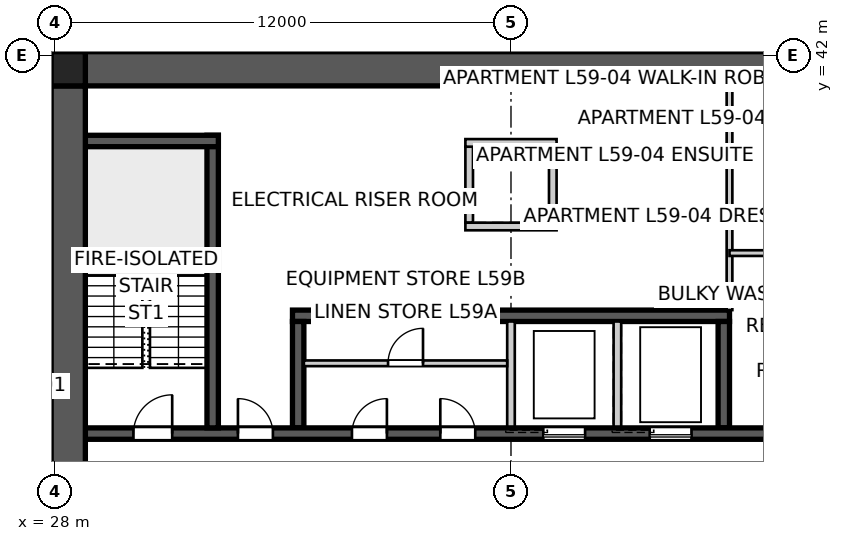
"""IFC4 building model, lengths in metres.
Left out: names, types, materials, properties, quantities, classifications, styles, units other than length and angle.
Written with IfcOpenShell. Run it as: python <this file> out.ifc"""

import sys

from ifc_helpers import new_model, si_unit, direction, frame, frame_2d, origin, origin_2d, place, context, subcontext, project, spatial, polyline, rectangle, outline, extrude, element, fill, save


model = new_model("IFC4")
c1 = context("Model", 3, precision=1e-05, world=origin(), true_north=direction((0.0, 1.0)))
c2 = subcontext(c1, "Body", "Model", "MODEL_VIEW")
j1 = project(units=[si_unit("LENGTHUNIT", "METRE"), si_unit("PLANEANGLEUNIT", "RADIAN")], contexts=[c1])
p1 = place(None, origin())
s1 = spatial("IfcSite", under=j1, at=p1, CompositionType="ELEMENT")
p2 = place(p1, origin())
s2 = spatial("IfcBuilding", under=s1, at=p2, CompositionType="ELEMENT")
p3 = place(p2, frame((0.0, 0.0, 215.0)))
s3 = spatial("IfcBuildingStorey", under=s2, at=p3, CompositionType="ELEMENT", Elevation=215.0)
p4 = place(p3, frame((28.8, 41.65, 0.0), z_axis=(0.0, 0.0, 1.0), x_axis=(1.0, 0.0, 0.0)))
e1 = element("IfcWall", 1, at=p4, inside=s3, PredefinedType="SHEAR", context=c2, shape_type="SweptSolid", body=[
    extrude(outline(polyline([(0.0, -0.45), (22.4, -0.45), (22.4, -0.025), (22.85, -0.025), (22.85, 0.025), (22.4, 0.025), (22.4, 0.45), (0.0, 0.45), (0.0, 0.025), (-0.45, 0.025), (-0.45, -0.025), (0.0, -0.025), (0.0, -0.45)])), origin(), (0.0, 0.0, 1.0), 3.4),
])
p5 = place(p3, frame((28.35, 41.2, 0.0), z_axis=(0.0, 0.0, 1.0), x_axis=(0.0, -1.0, 0.0)))
e2 = element("IfcWall", 2, at=p5, inside=s3, PredefinedType="SHEAR", context=c2, shape_type="SweptSolid", body=[
    extrude(outline(polyline([(0.0, -0.45), (22.4, -0.45), (22.4, -0.025), (22.85, -0.025), (22.85, 0.025), (22.4, 0.025), (22.4, 0.45), (0.0, 0.45), (0.0, 0.025), (-0.45, 0.025), (-0.45, -0.025), (0.0, -0.025), (0.0, -0.45)])), origin(), (0.0, 0.0, 1.0), 3.4),
])
p6 = place(p5, frame((11.14, 0.0, 0.0)))
e3 = element("IfcOpeningElement", 3, at=p6, cuts=e2, PredefinedType="OPENING", context=c2, shape_type="SweptSolid", body=[
    extrude(rectangle(XDim=1.02, YDim=2.4, at=frame_2d((0.51, 1.2))), frame((0.0, 0.46, 0.0), z_axis=(0.0, -1.0, 0.0), x_axis=(1.0, 0.0, 0.0)), (0.0, 0.0, 1.0), 0.92),
])
p7 = place(p3, frame((28.8, 32.05, 0.0), z_axis=(0.0, 0.0, 1.0), x_axis=(1.0, 0.0, 0.0)))
e4 = element("IfcWall", 4, at=p7, inside=s3, PredefinedType="SHEAR", context=c2, shape_type="SweptSolid", body=[
    extrude(rectangle(XDim=22.4, YDim=0.3, at=frame_2d((11.2, 0.0))), origin(), (0.0, 0.0, 1.0), 3.4),
])
p8 = place(p7, frame((19.04, 0.0, 0.0)))
e5 = element("IfcOpeningElement", 5, at=p8, cuts=e4, PredefinedType="OPENING", context=c2, shape_type="SweptSolid", body=[
    extrude(rectangle(XDim=0.92, YDim=2.1, at=frame_2d((0.46, 1.05))), frame((0.0, 0.16, 0.0), z_axis=(0.0, -1.0, 0.0), x_axis=(1.0, 0.0, 0.0)), (0.0, 0.0, 1.0), 0.32),
])
p9 = place(p7, frame((1.265, 0.0, 0.0)))
e6 = element("IfcOpeningElement", 6, at=p9, cuts=e4, PredefinedType="OPENING", context=c2, shape_type="SweptSolid", body=[
    extrude(rectangle(XDim=1.02, YDim=2.1, at=frame_2d((0.51, 1.05))), frame((0.0, 0.16, 0.0), z_axis=(0.0, -1.0, 0.0), x_axis=(1.0, 0.0, 0.0)), (0.0, 0.0, 1.0), 0.32),
])
p10 = place(p7, frame((4.015, 0.0, 0.0)))
e7 = element("IfcOpeningElement", 7, at=p10, cuts=e4, PredefinedType="OPENING", context=c2, shape_type="SweptSolid", body=[
    extrude(rectangle(XDim=0.92, YDim=2.1, at=frame_2d((0.46, 1.05))), frame((0.0, 0.16, 0.0), z_axis=(0.0, -1.0, 0.0), x_axis=(1.0, 0.0, 0.0)), (0.0, 0.0, 1.0), 0.32),
])
p11 = place(p7, frame((7.015, 0.0, 0.0)))
e8 = element("IfcOpeningElement", 8, at=p11, cuts=e4, PredefinedType="OPENING", context=c2, shape_type="SweptSolid", body=[
    extrude(rectangle(XDim=0.92, YDim=2.1, at=frame_2d((0.46, 1.05))), frame((0.0, 0.16, 0.0), z_axis=(0.0, -1.0, 0.0), x_axis=(1.0, 0.0, 0.0)), (0.0, 0.0, 1.0), 0.32),
])
p12 = place(p7, frame((9.34, 0.0, 0.0)))
e9 = element("IfcOpeningElement", 9, at=p12, cuts=e4, PredefinedType="OPENING", context=c2, shape_type="SweptSolid", body=[
    extrude(rectangle(XDim=0.92, YDim=2.1, at=frame_2d((0.46, 1.05))), frame((0.0, 0.16, 0.0), z_axis=(0.0, -1.0, 0.0), x_axis=(1.0, 0.0, 0.0)), (0.0, 0.0, 1.0), 0.32),
])
p13 = place(p7, frame((12.05, 0.0, 0.0)))
e10 = element("IfcOpeningElement", 10, at=p13, cuts=e4, PredefinedType="OPENING", context=c2, shape_type="SweptSolid", body=[
    extrude(rectangle(XDim=1.1, YDim=2.1, at=frame_2d((0.55, 1.05))), frame((0.0, 0.16, 0.0), z_axis=(0.0, -1.0, 0.0), x_axis=(1.0, 0.0, 0.0)), (0.0, 0.0, 1.0), 0.32),
])
p14 = place(p7, frame((14.85, 0.0, 0.0)))
e11 = element("IfcOpeningElement", 11, at=p14, cuts=e4, PredefinedType="OPENING", context=c2, shape_type="SweptSolid", body=[
    extrude(rectangle(XDim=1.1, YDim=2.1, at=frame_2d((0.55, 1.05))), frame((0.0, 0.16, 0.0), z_axis=(0.0, -1.0, 0.0), x_axis=(1.0, 0.0, 0.0)), (0.0, 0.0, 1.0), 0.32),
])
p15 = place(p3, frame((34.25, 35.15, 0.0), z_axis=(0.0, 0.0, 1.0), x_axis=(1.0, 0.0, 0.0)))
e12 = element("IfcWall", 12, at=p15, inside=s3, PredefinedType="SHEAR", context=c2, shape_type="SweptSolid", body=[
    extrude(rectangle(XDim=11.5, YDim=0.3, at=frame_2d((5.75, 0.0))), origin(), (0.0, 0.0, 1.0), 3.4),
])
p16 = place(p3, frame((34.4, 32.2, 0.0), z_axis=(0.0, 0.0, 1.0), x_axis=(0.0, 1.0, 0.0)))
e13 = element("IfcWall", 13, at=p16, inside=s3, PredefinedType="SHEAR", context=c2, shape_type="SweptSolid", body=[
    extrude(rectangle(XDim=2.8, YDim=0.3, at=frame_2d((1.4, 0.0))), origin(), (0.0, 0.0, 1.0), 3.4),
])
for number, where, z_axis, x_axis in (
    (14, (40.0, 32.2, 0.0), (0.0, 0.0, 1.0), (0.0, 1.0, 0.0)),
    (15, (42.8, 32.2, 0.0), (0.0, 0.0, 1.0), (0.0, 1.0, 0.0)),
):
    element("IfcWall", number, at=place(p3, frame(where, z_axis=z_axis, x_axis=x_axis)), inside=s3, PredefinedType="SOLIDWALL", context=c2, shape_type="SweptSolid", body=[
        extrude(rectangle(XDim=2.8, YDim=0.2, at=frame_2d((1.4, 0.0))), origin(), (0.0, 0.0, 1.0), 3.4),
    ])
p17 = place(p3, frame((45.6, 32.2, 0.0), z_axis=(0.0, 0.0, 1.0), x_axis=(0.0, 1.0, 0.0)))
e16 = element("IfcWall", 16, at=p17, inside=s3, PredefinedType="SHEAR", context=c2, shape_type="SweptSolid", body=[
    extrude(rectangle(XDim=2.8, YDim=0.3, at=frame_2d((1.4, 0.0))), origin(), (0.0, 0.0, 1.0), 3.4),
])
p18 = place(p3, frame((32.15, 32.2, 0.0), z_axis=(0.0, 0.0, 1.0), x_axis=(0.0, 1.0, 0.0)))
e17 = element("IfcWall", 17, at=p18, inside=s3, PredefinedType="SHEAR", context=c2, shape_type="SweptSolid", body=[
    extrude(rectangle(XDim=7.7, YDim=0.3, at=frame_2d((3.85, 0.0))), origin(), (0.0, 0.0, 1.0), 3.4),
])
p19 = place(p3, frame((28.8, 39.75, 0.0), z_axis=(0.0, 0.0, 1.0), x_axis=(1.0, 0.0, 0.0)))
e18 = element("IfcWall", 18, at=p19, inside=s3, PredefinedType="SHEAR", context=c2, shape_type="SweptSolid", body=[
    extrude(rectangle(XDim=3.5, YDim=0.3, at=frame_2d((1.75, 0.0))), origin(), (0.0, 0.0, 1.0), 3.4),
])
for number, where, z_axis, x_axis in (
    (19, (38.9, 37.6, 0.0), (0.0, 0.0, 1.0), (0.0, 1.0, 0.0)),
    (20, (41.1, 37.6, 0.0), (0.0, 0.0, 1.0), (0.0, 1.0, 0.0)),
):
    element("IfcWall", number, at=place(p3, frame(where, z_axis=z_axis, x_axis=x_axis)), inside=s3, PredefinedType="SOLIDWALL", context=c2, shape_type="SweptSolid", body=[
        extrude(rectangle(XDim=2.0, YDim=0.2, at=frame_2d((1.0, 0.0))), origin(), (0.0, 0.0, 1.0), 3.4),
    ])
for number, where, z_axis, x_axis in (
    (21, (38.8, 37.5, 0.0), (0.0, 0.0, 1.0), (1.0, 0.0, 0.0)),
    (22, (38.8, 39.7, 0.0), (0.0, 0.0, 1.0), (1.0, 0.0, 0.0)),
):
    element("IfcWall", number, at=place(p3, frame(where, z_axis=z_axis, x_axis=x_axis)), inside=s3, PredefinedType="SOLIDWALL", context=c2, shape_type="SweptSolid", body=[
        extrude(rectangle(XDim=2.4, YDim=0.2, at=frame_2d((1.2, 0.0))), origin(), (0.0, 0.0, 1.0), 3.4),
    ])
p20 = place(p3, frame((28.35, 41.65, 0.0), z_axis=(0.0, 0.0, 1.0), x_axis=(1.0, 0.0, 0.0)))
e23 = element("IfcColumn", 23, at=p20, inside=s3, PredefinedType="COLUMN", context=c2, shape_type="SweptSolid", body=[
    extrude(rectangle(XDim=0.9, YDim=0.9, at=origin_2d()), origin(), (0.0, 0.0, 1.0), 3.4),
])
p21 = place(p3, frame((45.75, 41.2, 0.0), z_axis=(0.0, 0.0, 1.0), x_axis=(0.0, -1.0, 0.0)))
e24 = element("IfcWall", 24, at=p21, inside=s3, PredefinedType="SOLIDWALL", context=c2, shape_type="SweptSolid", body=[
    extrude(rectangle(XDim=5.9, YDim=0.15, at=frame_2d((2.95, 0.0))), origin(), (0.0, 0.0, 1.0), 3.25),
])
p22 = place(p3, frame((45.75, 36.8, 0.0), z_axis=(0.0, 0.0, 1.0), x_axis=(1.0, 0.0, 0.0)))
e25 = element("IfcWall", 25, at=p22, inside=s3, PredefinedType="SOLIDWALL", context=c2, shape_type="SweptSolid", body=[
    extrude(rectangle(XDim=5.45, YDim=0.15, at=frame_2d((2.725, 0.0))), origin(), (0.0, 0.0, 1.0), 3.25),
])
p23 = place(p22, frame((2.265, 0.0, 0.0)))
e26 = element("IfcOpeningElement", 26, at=p23, cuts=e25, PredefinedType="OPENING", context=c2, shape_type="SweptSolid", body=[
    extrude(rectangle(XDim=0.92, YDim=2.1, at=frame_2d((0.46, 1.05))), frame((0.0, 0.085, 0.0), z_axis=(0.0, -1.0, 0.0), x_axis=(1.0, 0.0, 0.0)), (0.0, 0.0, 1.0), 0.17),
])
p24 = place(p3, frame((27.9, 41.687, 0.0), z_axis=(0.0, 0.0, 1.0), x_axis=(0.999162409553, -0.040920402453, 0.0)))
e27 = element("IfcWall", 27, at=p24, inside=s3, PredefinedType="PARTITIONING", context=c2, shape_type="SweptSolid", body=[
    extrude(rectangle(XDim=0.901, YDim=0.12, at=frame_2d((0.45, 0.0))), origin(), (0.0, 0.0, 1.0), 3.25),
])
p25 = place(p3, frame((34.55, 33.9, 0.0), z_axis=(0.0, 0.0, 1.0), x_axis=(1.0, 0.0, 0.0)))
e28 = element("IfcWall", 28, at=p25, inside=s3, PredefinedType="SOLIDWALL", context=c2, shape_type="SweptSolid", body=[
    extrude(rectangle(XDim=5.35, YDim=0.15, at=frame_2d((2.675, 0.0))), origin(), (0.0, 0.0, 1.0), 3.25),
])
p26 = place(p25, frame((2.215, 0.0, 0.0)))
e29 = element("IfcOpeningElement", 29, at=p26, cuts=e28, PredefinedType="OPENING", context=c2, shape_type="SweptSolid", body=[
    extrude(rectangle(XDim=0.92, YDim=2.1, at=frame_2d((0.46, 1.05))), frame((0.0, 0.085, 0.0), z_axis=(0.0, -1.0, 0.0), x_axis=(1.0, 0.0, 0.0)), (0.0, 0.0, 1.0), 0.17),
])
p27 = place(p9, origin())
e30 = element("IfcDoor", 30, at=p27, inside=s3, OperationType="SINGLE_SWING_RIGHT", PredefinedType="DOOR", context=c2, shape_type="SweptSolid", body=[
    extrude(rectangle(XDim=1.02, YDim=2.1, at=frame_2d((0.51, 1.05))), frame((0.0, 0.025, 0.0), z_axis=(0.0, -1.0, 0.0), x_axis=(1.0, 0.0, 0.0)), (0.0, 0.0, 1.0), 0.05),
])
fill(e6, e30)
p28 = place(p10, origin())
e31 = element("IfcDoor", 31, at=p28, inside=s3, OperationType="SINGLE_SWING_LEFT", PredefinedType="DOOR", context=c2, shape_type="SweptSolid", body=[
    extrude(rectangle(XDim=0.92, YDim=2.1, at=frame_2d((0.46, 1.05))), frame((0.0, 0.025, 0.0), z_axis=(0.0, -1.0, 0.0), x_axis=(1.0, 0.0, 0.0)), (0.0, 0.0, 1.0), 0.05),
])
fill(e7, e31)
p29 = place(p11, origin())
e32 = element("IfcDoor", 32, at=p29, inside=s3, OperationType="SINGLE_SWING_RIGHT", PredefinedType="DOOR", context=c2, shape_type="SweptSolid", body=[
    extrude(rectangle(XDim=0.92, YDim=2.1, at=frame_2d((0.46, 1.05))), frame((0.0, 0.025, 0.0), z_axis=(0.0, -1.0, 0.0), x_axis=(1.0, 0.0, 0.0)), (0.0, 0.0, 1.0), 0.05),
])
fill(e8, e32)
p30 = place(p12, origin())
e33 = element("IfcDoor", 33, at=p30, inside=s3, OperationType="SINGLE_SWING_LEFT", PredefinedType="DOOR", context=c2, shape_type="SweptSolid", body=[
    extrude(rectangle(XDim=0.92, YDim=2.1, at=frame_2d((0.46, 1.05))), frame((0.0, 0.025, 0.0), z_axis=(0.0, -1.0, 0.0), x_axis=(1.0, 0.0, 0.0)), (0.0, 0.0, 1.0), 0.05),
])
fill(e9, e33)
p31 = place(p26, origin())
e34 = element("IfcDoor", 34, at=p31, inside=s3, OperationType="SINGLE_SWING_RIGHT", PredefinedType="DOOR", context=c2, shape_type="SweptSolid", body=[
    extrude(rectangle(XDim=0.92, YDim=2.1, at=frame_2d((0.46, 1.05))), frame((0.0, 0.025, 0.0), z_axis=(0.0, -1.0, 0.0), x_axis=(1.0, 0.0, 0.0)), (0.0, 0.0, 1.0), 0.05),
])
fill(e29, e34)
p32 = place(p13, origin())
e35 = element("IfcDoor", 35, at=p32, inside=s3, OperationType="SLIDING_TO_LEFT", PredefinedType="DOOR", context=c2, shape_type="SweptSolid", body=[
    extrude(rectangle(XDim=1.1, YDim=2.1, at=frame_2d((0.55, 1.05))), frame((0.0, 0.025, 0.0), z_axis=(0.0, -1.0, 0.0), x_axis=(1.0, 0.0, 0.0)), (0.0, 0.0, 1.0), 0.05),
])
fill(e10, e35)
p33 = place(p14, origin())
e36 = element("IfcDoor", 36, at=p33, inside=s3, OperationType="SLIDING_TO_LEFT", PredefinedType="DOOR", context=c2, shape_type="SweptSolid", body=[
    extrude(rectangle(XDim=1.1, YDim=2.1, at=frame_2d((0.55, 1.05))), frame((0.0, 0.025, 0.0), z_axis=(0.0, -1.0, 0.0), x_axis=(1.0, 0.0, 0.0)), (0.0, 0.0, 1.0), 0.05),
])
fill(e11, e36)
save(model, sys.argv[1])
